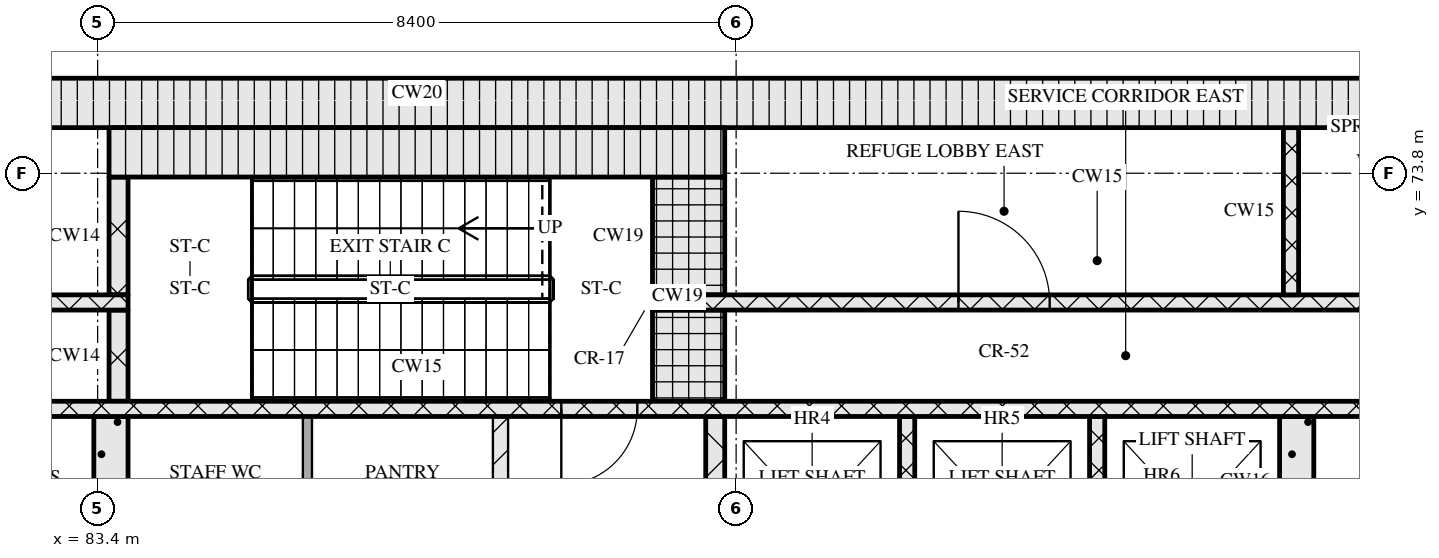
"""IFC4 building model, lengths in metres.
Left out: names, types, materials, properties, quantities, classifications, styles, units other than length and angle.
Written with IfcOpenShell. Run it as: python <this file> out.ifc"""

import sys

from ifc_helpers import new_model, si_unit, direction, frame, frame_2d, origin, place, context, subcontext, project, spatial, rectangle, extrude, element, fill, save


model = new_model("IFC4")
c1 = context("Model", 3, precision=1e-05, world=origin(), true_north=direction((0.0, 1.0)))
c2 = subcontext(c1, "Body", "Model", "MODEL_VIEW")
j1 = project(units=[si_unit("LENGTHUNIT", "METRE"), si_unit("PLANEANGLEUNIT", "RADIAN")], contexts=[c1])
p1 = place(None, origin())
s1 = spatial("IfcSite", under=j1, at=p1, CompositionType="ELEMENT")
p2 = place(p1, origin())
s2 = spatial("IfcBuilding", under=s1, at=p2, CompositionType="ELEMENT")
p3 = place(p2, frame((0.0, 0.0, 194.25)))
s3 = spatial("IfcBuildingStorey", under=s2, at=p3, CompositionType="ELEMENT", Elevation=194.25)
p4 = place(p3, frame((67.15, 74.725, 0.0), z_axis=(0.0, 0.0, 1.0), x_axis=(1.0, 0.0, 0.0)))
e1 = element("IfcWall", 1, at=p4, inside=s3, PredefinedType="SOLIDWALL", context=c2, shape_type="SweptSolid", body=[
    extrude(rectangle(XDim=40.9, YDim=0.65, at=frame_2d((20.45, 0.0))), origin(), (0.0, 0.0, 1.0), 10.97),
])
p5 = place(p3, frame((83.575, 68.0, 0.0), z_axis=(0.0, 0.0, 1.0), x_axis=(0.0, 1.0, 0.0)))
e2 = element("IfcWall", 2, at=p5, inside=s3, PredefinedType="SOLIDWALL", context=c2, shape_type="SweptSolid", body=[
    extrude(rectangle(XDim=2.6, YDim=0.45, at=frame_2d((1.3, 0.0))), origin(), (0.0, 0.0, 1.0), 10.97),
])
p6 = place(p3, frame((86.16, 68.0, 0.0), z_axis=(0.0, 0.0, 1.0), x_axis=(0.0, 1.0, 0.0)))
e3 = element("IfcWall", 3, at=p6, inside=s3, PredefinedType="PARTITIONING", context=c2, shape_type="SweptSolid", body=[
    extrude(rectangle(XDim=2.6, YDim=0.12, at=frame_2d((1.3, 0.0))), origin(), (0.0, 0.0, 1.0), 10.97),
])
p7 = place(p3, frame((88.7, 68.0, 0.0), z_axis=(0.0, 0.0, 1.0), x_axis=(0.0, 1.0, 0.0)))
e4 = element("IfcWall", 4, at=p7, inside=s3, PredefinedType="PARTITIONING", context=c2, shape_type="SweptSolid", body=[
    extrude(rectangle(XDim=2.6, YDim=0.2, at=frame_2d((1.3, 0.0))), origin(), (0.0, 0.0, 1.0), 10.97),
])
p8 = place(p3, frame((91.525, 68.0, 0.0), z_axis=(0.0, 0.0, 1.0), x_axis=(0.0, 1.0, 0.0)))
e5 = element("IfcWall", 5, at=p8, inside=s3, PredefinedType="SOLIDWALL", context=c2, shape_type="SweptSolid", body=[
    extrude(rectangle(XDim=2.6, YDim=0.25, at=frame_2d((1.3, 0.0))), origin(), (0.0, 0.0, 1.0), 10.97),
])
for number, where, z_axis, x_axis in (
    (6, (94.05, 68.0, 0.0), (0.0, 0.0, 1.0), (0.0, 1.0, 0.0)),
    (7, (96.55, 68.0, 0.0), (0.0, 0.0, 1.0), (0.0, 1.0, 0.0)),
):
    element("IfcWall", number, at=place(p3, frame(where, z_axis=z_axis, x_axis=x_axis)), inside=s3, PredefinedType="SOLIDWALL", context=c2, shape_type="SweptSolid", body=[
        extrude(rectangle(XDim=2.6, YDim=0.2, at=frame_2d((1.3, 0.0))), origin(), (0.0, 0.0, 1.0), 10.97),
    ])
p9 = place(p3, frame((99.175, 68.3, 0.0), z_axis=(0.0, 0.0, 1.0), x_axis=(0.0, 1.0, 0.0)))
e8 = element("IfcWall", 8, at=p9, inside=s3, PredefinedType="SOLIDWALL", context=c2, shape_type="SweptSolid", body=[
    extrude(rectangle(XDim=2.3, YDim=0.45, at=frame_2d((1.15, 0.0))), origin(), (0.0, 0.0, 1.0), 10.97),
])
p10 = place(p3, frame((67.8, 70.7, 0.0), z_axis=(0.0, 0.0, 1.0), x_axis=(1.0, 0.0, 0.0)))
e9 = element("IfcWall", 9, at=p10, inside=s3, PredefinedType="SOLIDWALL", context=c2, shape_type="SweptSolid", body=[
    extrude(rectangle(XDim=39.6, YDim=0.2, at=frame_2d((19.8, 0.0))), origin(), (0.0, 0.0, 1.0), 10.97),
])
p11 = place(p10, frame((0.65, 0.0, 0.0)))
e10 = element("IfcOpeningElement", 10, at=p11, cuts=e9, PredefinedType="OPENING", context=c2, shape_type="SweptSolid", body=[
    extrude(rectangle(XDim=1.1, YDim=2.1, at=frame_2d((0.55, 1.05))), frame((0.0, 0.11, 0.0), z_axis=(0.0, -1.0, 0.0), x_axis=(1.0, 0.0, 0.0)), (0.0, 0.0, 1.0), 0.22),
])
p12 = place(p10, frame((3.25, 0.0, 0.0)))
e11 = element("IfcOpeningElement", 11, at=p12, cuts=e9, PredefinedType="OPENING", context=c2, shape_type="SweptSolid", body=[
    extrude(rectangle(XDim=1.1, YDim=2.1, at=frame_2d((0.55, 1.05))), frame((0.0, 0.11, 0.0), z_axis=(0.0, -1.0, 0.0), x_axis=(1.0, 0.0, 0.0)), (0.0, 0.0, 1.0), 0.22),
])
p13 = place(p10, frame((5.9, 0.0, 0.0)))
e12 = element("IfcOpeningElement", 12, at=p13, cuts=e9, PredefinedType="OPENING", context=c2, shape_type="SweptSolid", body=[
    extrude(rectangle(XDim=1.0, YDim=2.1, at=frame_2d((0.5, 1.05))), frame((0.0, 0.11, 0.0), z_axis=(0.0, -1.0, 0.0), x_axis=(1.0, 0.0, 0.0)), (0.0, 0.0, 1.0), 0.22),
])
p14 = place(p10, frame((21.7, 0.0, 0.0)))
e13 = element("IfcOpeningElement", 13, at=p14, cuts=e9, PredefinedType="OPENING", context=c2, shape_type="SweptSolid", body=[
    extrude(rectangle(XDim=1.0, YDim=2.1, at=frame_2d((0.5, 1.05))), frame((0.0, 0.11, 0.0), z_axis=(0.0, -1.0, 0.0), x_axis=(1.0, 0.0, 0.0)), (0.0, 0.0, 1.0), 0.22),
])
p15 = place(p10, frame((32.7, 0.0, 0.0)))
e14 = element("IfcOpeningElement", 14, at=p15, cuts=e9, PredefinedType="OPENING", context=c2, shape_type="SweptSolid", body=[
    extrude(rectangle(XDim=1.0, YDim=2.1, at=frame_2d((0.5, 1.05))), frame((0.0, 0.11, 0.0), z_axis=(0.0, -1.0, 0.0), x_axis=(1.0, 0.0, 0.0)), (0.0, 0.0, 1.0), 0.22),
])
p16 = place(p10, frame((35.25, 0.0, 0.0)))
e15 = element("IfcOpeningElement", 15, at=p16, cuts=e9, PredefinedType="OPENING", context=c2, shape_type="SweptSolid", body=[
    extrude(rectangle(XDim=1.1, YDim=2.1, at=frame_2d((0.55, 1.05))), frame((0.0, 0.11, 0.0), z_axis=(0.0, -1.0, 0.0), x_axis=(1.0, 0.0, 0.0)), (0.0, 0.0, 1.0), 0.22),
])
p17 = place(p10, frame((37.85, 0.0, 0.0)))
e16 = element("IfcOpeningElement", 16, at=p17, cuts=e9, PredefinedType="OPENING", context=c2, shape_type="SweptSolid", body=[
    extrude(rectangle(XDim=1.1, YDim=2.1, at=frame_2d((0.55, 1.05))), frame((0.0, 0.11, 0.0), z_axis=(0.0, -1.0, 0.0), x_axis=(1.0, 0.0, 0.0)), (0.0, 0.0, 1.0), 0.22),
])
p18 = place(p3, frame((83.675, 70.8, 0.0), z_axis=(0.0, 0.0, 1.0), x_axis=(0.0, 1.0, 0.0)))
e17 = element("IfcWall", 17, at=p18, inside=s3, PredefinedType="SOLIDWALL", context=c2, shape_type="SweptSolid", body=[
    extrude(rectangle(XDim=1.2, YDim=0.25, at=frame_2d((0.6, 0.0))), origin(), (0.0, 0.0, 1.0), 10.97),
])
p19 = place(p3, frame((91.175, 70.8, 0.0), z_axis=(0.0, 0.0, 1.0), x_axis=(0.0, 1.0, 0.0)))
e18 = element("IfcWall", 18, at=p19, inside=s3, PredefinedType="SOLIDWALL", context=c2, shape_type="SweptSolid", body=[
    extrude(rectangle(XDim=1.2, YDim=0.95, at=frame_2d((0.6, 0.0))), origin(), (0.0, 0.0, 1.0), 10.97),
])
p20 = place(p3, frame((72.8, 72.1, 0.0), z_axis=(0.0, 0.0, 1.0), x_axis=(1.0, 0.0, 0.0)))
e19 = element("IfcWall", 19, at=p20, inside=s3, PredefinedType="SOLIDWALL", context=c2, shape_type="SweptSolid", body=[
    extrude(rectangle(XDim=11.0, YDim=0.2, at=frame_2d((5.5, 0.0))), origin(), (0.0, 0.0, 1.0), 10.97),
])
p21 = place(p20, frame((1.25, 0.0, 0.0)))
e20 = element("IfcOpeningElement", 20, at=p21, cuts=e19, PredefinedType="OPENING", context=c2, shape_type="SweptSolid", body=[
    extrude(rectangle(XDim=0.9, YDim=2.1, at=frame_2d((0.45, 1.05))), frame((0.0, 0.11, 0.0), z_axis=(0.0, -1.0, 0.0), x_axis=(1.0, 0.0, 0.0)), (0.0, 0.0, 1.0), 0.22),
])
p22 = place(p20, frame((6.475, 0.0, 0.0)))
e21 = element("IfcOpeningElement", 21, at=p22, cuts=e19, PredefinedType="OPENING", context=c2, shape_type="SweptSolid", body=[
    extrude(rectangle(XDim=1.2, YDim=2.1, at=frame_2d((0.6, 1.05))), frame((0.0, 0.11, 0.0), z_axis=(0.0, -1.0, 0.0), x_axis=(1.0, 0.0, 0.0)), (0.0, 0.0, 1.0), 0.22),
])
p23 = place(p3, frame((90.7, 72.1, 0.0), z_axis=(0.0, 0.0, 1.0), x_axis=(1.0, 0.0, 0.0)))
e22 = element("IfcWall", 22, at=p23, inside=s3, PredefinedType="SOLIDWALL", context=c2, shape_type="SweptSolid", body=[
    extrude(rectangle(XDim=11.7, YDim=0.2, at=frame_2d((5.85, 0.0))), origin(), (0.0, 0.0, 1.0), 10.97),
])
p24 = place(p23, frame((4.025, 0.0, 0.0)))
e23 = element("IfcOpeningElement", 23, at=p24, cuts=e22, PredefinedType="OPENING", context=c2, shape_type="SweptSolid", body=[
    extrude(rectangle(XDim=1.2, YDim=2.1, at=frame_2d((0.6, 1.05))), frame((0.0, 0.11, 0.0), z_axis=(0.0, -1.0, 0.0), x_axis=(1.0, 0.0, 0.0)), (0.0, 0.0, 1.0), 0.22),
])
p25 = place(p23, frame((9.55, 0.0, 0.0)))
e24 = element("IfcOpeningElement", 24, at=p25, cuts=e22, PredefinedType="OPENING", context=c2, shape_type="SweptSolid", body=[
    extrude(rectangle(XDim=0.9, YDim=2.1, at=frame_2d((0.45, 1.05))), frame((0.0, 0.11, 0.0), z_axis=(0.0, -1.0, 0.0), x_axis=(1.0, 0.0, 0.0)), (0.0, 0.0, 1.0), 0.22),
])
p26 = place(p3, frame((83.675, 72.2, 0.0), z_axis=(0.0, 0.0, 1.0), x_axis=(0.0, 1.0, 0.0)))
e25 = element("IfcWall", 25, at=p26, inside=s3, PredefinedType="SOLIDWALL", context=c2, shape_type="SweptSolid", body=[
    extrude(rectangle(XDim=1.55, YDim=0.25, at=frame_2d((0.775, 0.0))), origin(), (0.0, 0.0, 1.0), 10.97),
])
p27 = place(p3, frame((91.175, 72.2, 0.0), z_axis=(0.0, 0.0, 1.0), x_axis=(0.0, 1.0, 0.0)))
e26 = element("IfcWall", 26, at=p27, inside=s3, PredefinedType="SOLIDWALL", context=c2, shape_type="SweptSolid", body=[
    extrude(rectangle(XDim=1.55, YDim=0.95, at=frame_2d((0.775, 0.0))), origin(), (0.0, 0.0, 1.0), 10.97),
])
p28 = place(p3, frame((99.1, 72.2, 0.0), z_axis=(0.0, 0.0, 1.0), x_axis=(0.0, 1.0, 0.0)))
e27 = element("IfcWall", 27, at=p28, inside=s3, PredefinedType="SOLIDWALL", context=c2, shape_type="SweptSolid", body=[
    extrude(rectangle(XDim=2.2, YDim=0.2, at=frame_2d((1.1, 0.0))), origin(), (0.0, 0.0, 1.0), 10.97),
])
p29 = place(p3, frame((83.55, 74.075, 0.0), z_axis=(0.0, 0.0, 1.0), x_axis=(1.0, 0.0, 0.0)))
e28 = element("IfcWall", 28, at=p29, inside=s3, PredefinedType="SOLIDWALL", context=c2, shape_type="SweptSolid", body=[
    extrude(rectangle(XDim=8.1, YDim=0.65, at=frame_2d((4.05, 0.0))), origin(), (0.0, 0.0, 1.0), 10.97),
])
p30 = place(p14, origin())
e29 = element("IfcDoor", 29, at=p30, inside=s3, OperationType="SINGLE_SWING_RIGHT", PredefinedType="DOOR", context=c2, shape_type="SweptSolid", body=[
    extrude(rectangle(XDim=1.0, YDim=2.1, at=frame_2d((0.5, 1.05))), frame((0.0, 0.025, 0.0), z_axis=(0.0, -1.0, 0.0), x_axis=(1.0, 0.0, 0.0)), (0.0, 0.0, 1.0), 0.05),
])
fill(e13, e29)
p31 = place(p24, origin())
e30 = element("IfcDoor", 30, at=p31, inside=s3, OperationType="SINGLE_SWING_LEFT", PredefinedType="DOOR", context=c2, shape_type="SweptSolid", body=[
    extrude(rectangle(XDim=1.2, YDim=2.1, at=frame_2d((0.6, 1.05))), frame((0.0, 0.025, 0.0), z_axis=(0.0, -1.0, 0.0), x_axis=(1.0, 0.0, 0.0)), (0.0, 0.0, 1.0), 0.05),
])
fill(e23, e30)
save(model, sys.argv[1])
